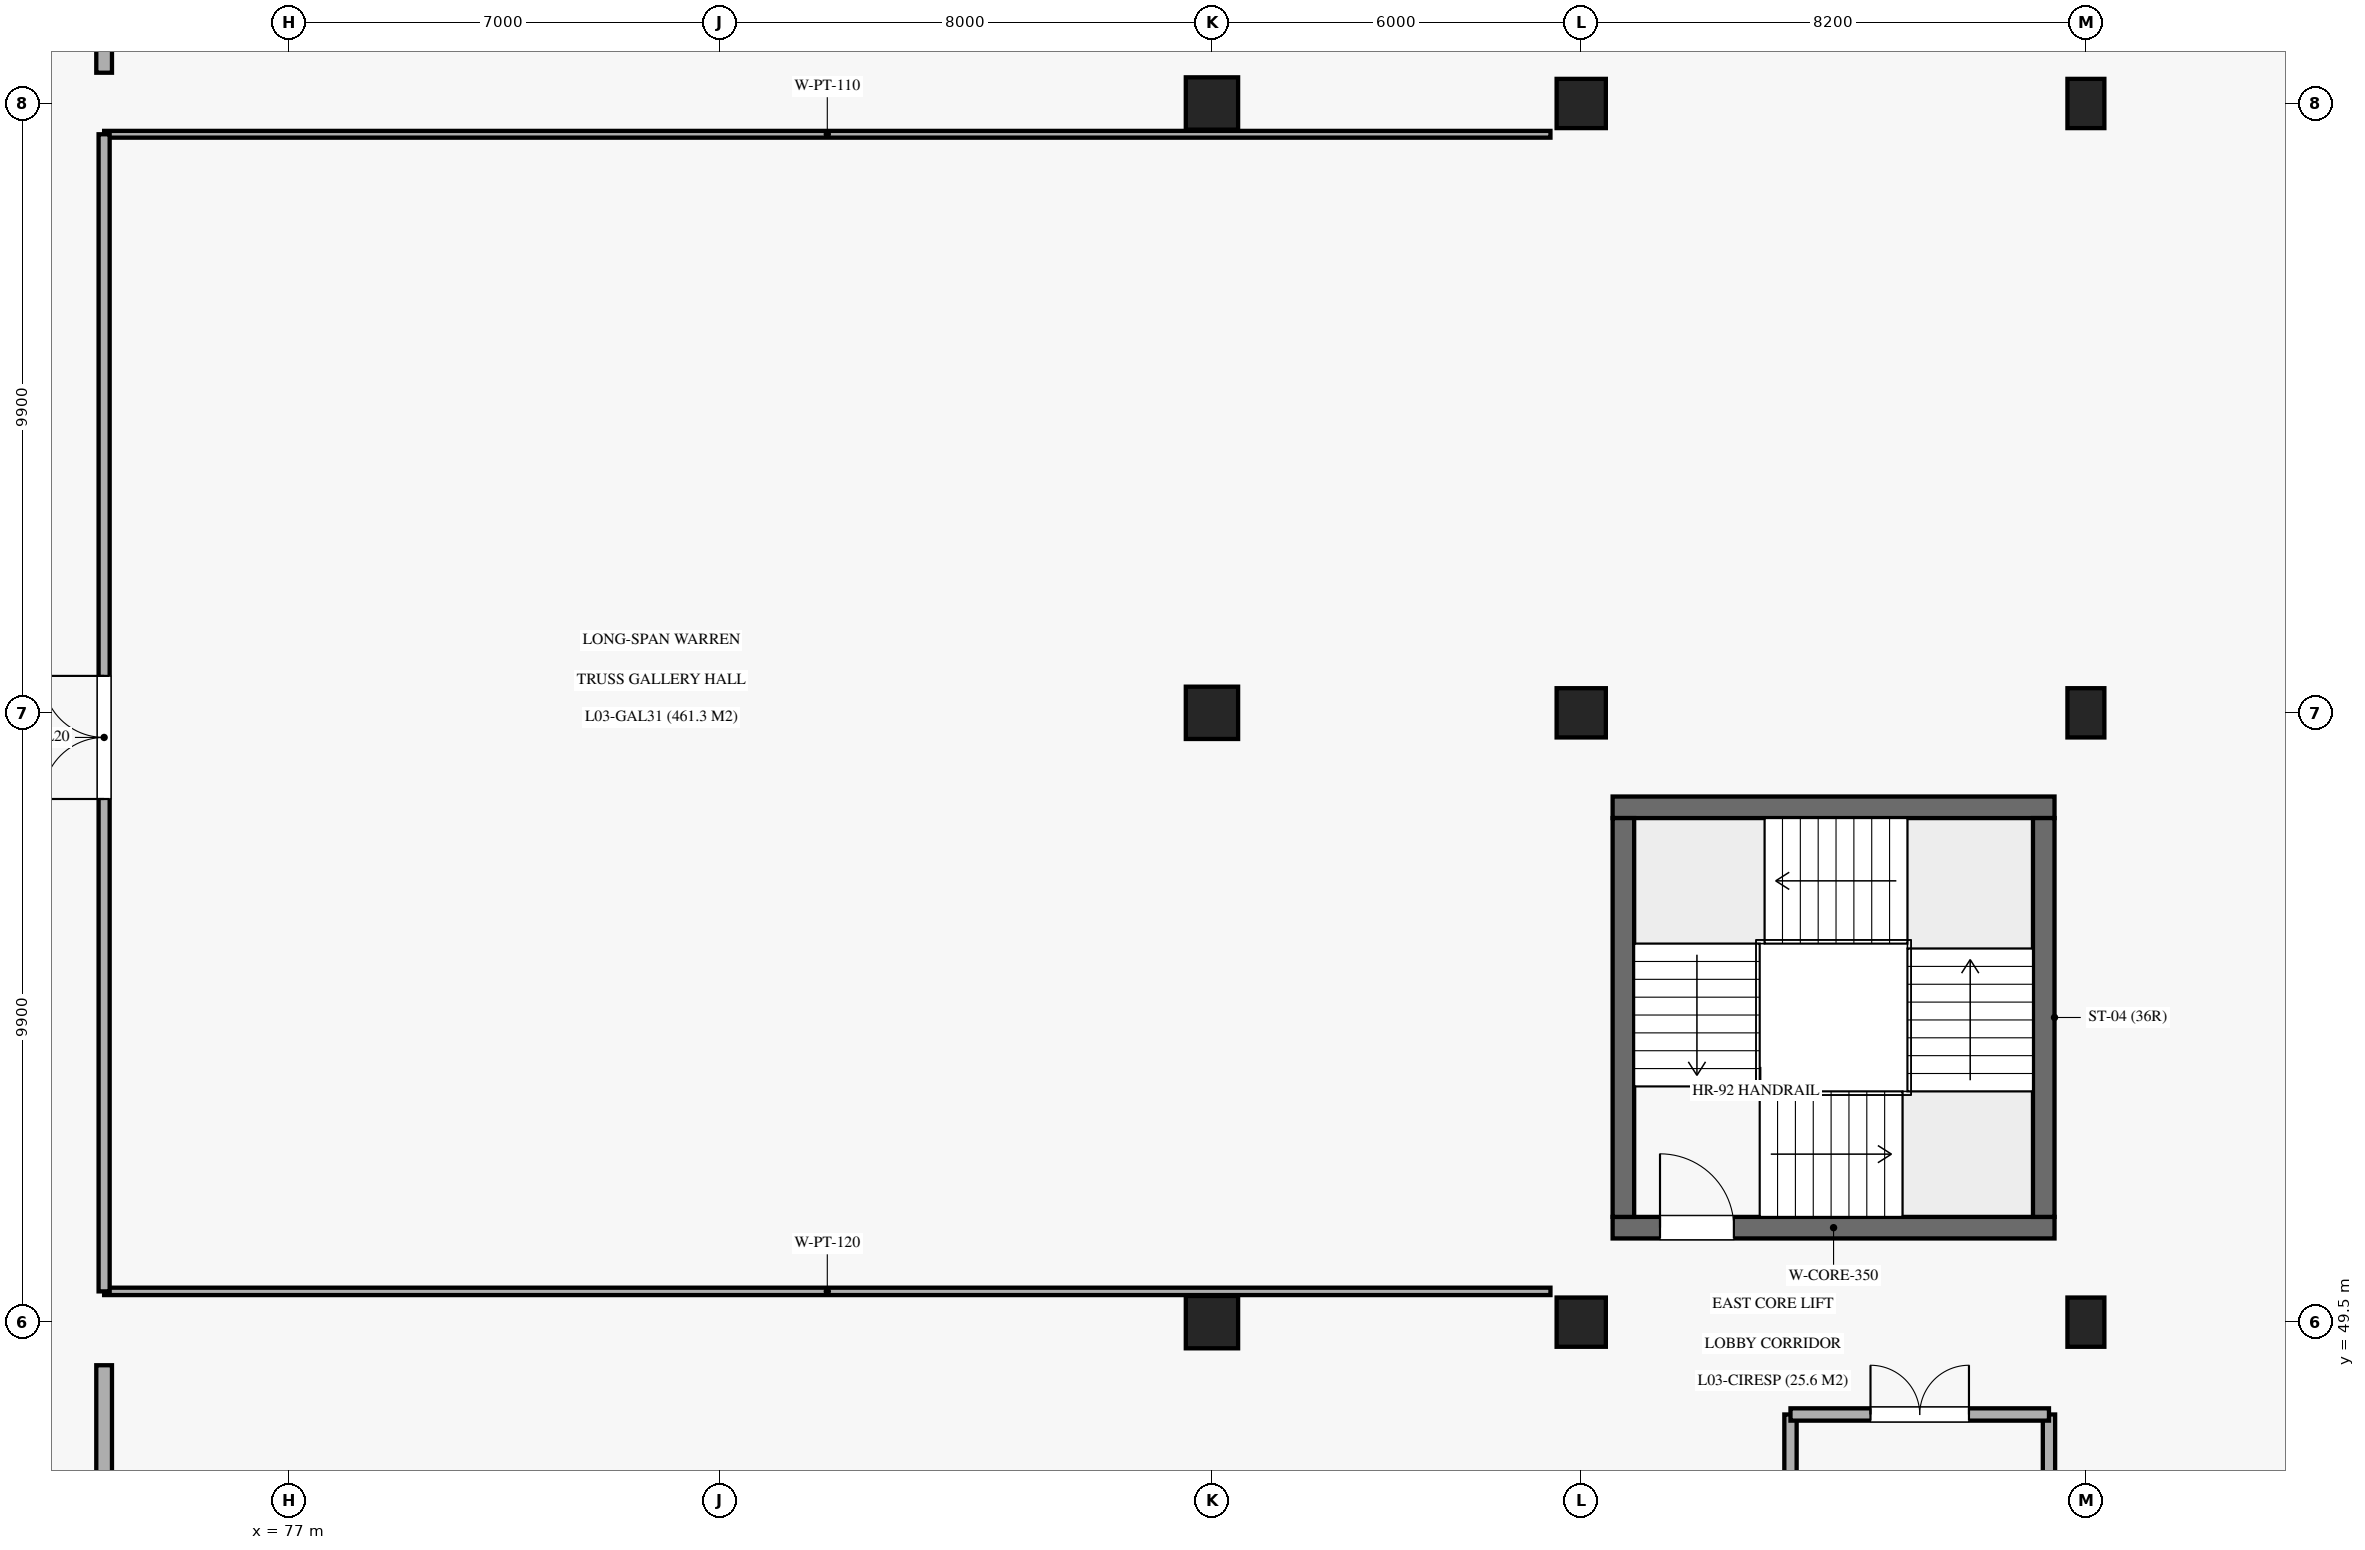
"""IFC4 building model, lengths in metres.
Left out: names, types, materials, properties, quantities, classifications, styles, units other than length and angle.
Written with IfcOpenShell. Run it as: python <this file> out.ifc"""

import sys

from ifc_helpers import new_model, si_unit, direction, frame, frame_2d, origin, origin_2d, place, context, subcontext, project, spatial, rectangle, extrude, element, fill, save


model = new_model("IFC4")
c1 = context("Model", 3, precision=1e-05, world=origin(), true_north=direction((0.0, 1.0)))
c2 = subcontext(c1, "Body", "Model", "MODEL_VIEW")
j1 = project(units=[si_unit("LENGTHUNIT", "METRE"), si_unit("PLANEANGLEUNIT", "RADIAN")], contexts=[c1])
p1 = place(None, origin())
s1 = spatial("IfcSite", under=j1, at=p1, CompositionType="ELEMENT")
p2 = place(p1, origin())
s2 = spatial("IfcBuilding", under=s1, at=p2, CompositionType="ELEMENT")
p3 = place(p2, frame((0.0, 0.0, 16.32)))
s3 = spatial("IfcBuildingStorey", under=s2, at=p3, CompositionType="ELEMENT", Elevation=16.32)
for number, where, z_axis, x_axis in (
    (1, (92.0, 49.5, 0.0), (0.0, 0.0, 1.0), (1.0, 0.0, 0.0)),
    (2, (92.0, 59.4, 0.0), (0.0, 0.0, 1.0), (1.0, 0.0, 0.0)),
    (3, (92.0, 69.3, 0.0), (0.0, 0.0, 1.0), (1.0, 0.0, 0.0)),
):
    element("IfcColumn", number, at=place(p3, frame(where, z_axis=z_axis, x_axis=x_axis)), inside=s3, PredefinedType="COLUMN", context=c2, shape_type="SweptSolid", body=[
        extrude(rectangle(XDim=0.85, YDim=0.85, at=origin_2d()), origin(), (0.0, 0.0, 1.0), 6.12),
    ])
for number, where, z_axis, x_axis in (
    (4, (98.0, 49.5, 0.0), (0.0, 0.0, 1.0), (1.0, 0.0, 0.0)),
    (5, (98.0, 59.4, 0.0), (0.0, 0.0, 1.0), (1.0, 0.0, 0.0)),
    (6, (98.0, 69.3, 0.0), (0.0, 0.0, 1.0), (1.0, 0.0, 0.0)),
):
    element("IfcColumn", number, at=place(p3, frame(where, z_axis=z_axis, x_axis=x_axis)), inside=s3, PredefinedType="COLUMN", context=c2, shape_type="SweptSolid", body=[
        extrude(rectangle(XDim=0.8, YDim=0.8, at=origin_2d()), origin(), (0.0, 0.0, 1.0), 6.12),
    ])
for number, where, z_axis, x_axis in (
    (7, (106.2, 49.5, 0.0), (0.0, 0.0, 1.0), (1.0, 0.0, 0.0)),
    (8, (106.2, 59.4, 0.0), (0.0, 0.0, 1.0), (1.0, 0.0, 0.0)),
    (9, (106.2, 69.3, 0.0), (0.0, 0.0, 1.0), (1.0, 0.0, 0.0)),
):
    element("IfcColumn", number, at=place(p3, frame(where, z_axis=z_axis, x_axis=x_axis)), inside=s3, PredefinedType="COLUMN", context=c2, shape_type="SweptSolid", body=[
        extrude(rectangle(XDim=0.6, YDim=0.8, at=origin_2d()), origin(), (0.0, 0.0, 1.0), 6.12),
    ])
p4 = place(p3, frame((98.51, 51.035, 0.0), z_axis=(0.0, 0.0, 1.0), x_axis=(1.0, 0.0, 0.0)))
e10 = element("IfcWall", 10, at=p4, inside=s3, PredefinedType="SHEAR", context=c2, shape_type="SweptSolid", body=[
    extrude(rectangle(XDim=7.18, YDim=0.35, at=frame_2d((3.59, 0.0))), origin(), (0.0, 0.0, 1.0), 5.86),
])
p5 = place(p4, frame((0.77, 0.0, 0.0)))
e11 = element("IfcOpeningElement", 11, at=p5, cuts=e10, PredefinedType="OPENING", context=c2, shape_type="SweptSolid", body=[
    extrude(rectangle(XDim=1.2, YDim=2.2, at=frame_2d((0.6, 1.1))), frame((0.0, 0.185, 0.0), z_axis=(0.0, -1.0, 0.0), x_axis=(1.0, 0.0, 0.0)), (0.0, 0.0, 1.0), 0.37),
])
p6 = place(p3, frame((98.51, 57.865, 0.0), z_axis=(0.0, 0.0, 1.0), x_axis=(1.0, 0.0, 0.0)))
e12 = element("IfcWall", 12, at=p6, inside=s3, PredefinedType="SHEAR", context=c2, shape_type="SweptSolid", body=[
    extrude(rectangle(XDim=7.18, YDim=0.35, at=frame_2d((3.59, 0.0))), origin(), (0.0, 0.0, 1.0), 5.86),
])
for number, where, z_axis, x_axis in (
    (13, (98.685, 51.21, 0.0), (0.0, 0.0, 1.0), (0.0, 1.0, 0.0)),
    (14, (105.515, 51.21, 0.0), (0.0, 0.0, 1.0), (0.0, 1.0, 0.0)),
):
    element("IfcWall", number, at=place(p3, frame(where, z_axis=z_axis, x_axis=x_axis)), inside=s3, PredefinedType="SHEAR", context=c2, shape_type="SweptSolid", body=[
        extrude(rectangle(XDim=6.48, YDim=0.35, at=frame_2d((3.24, 0.0))), origin(), (0.0, 0.0, 1.0), 5.86),
    ])
p7 = place(p3, frame((101.4, 45.6, 0.0), z_axis=(0.0, 0.0, 1.0), x_axis=(0.0, 1.0, 0.0)))
e15 = element("IfcWall", 15, at=p7, inside=s3, PredefinedType="SOLIDWALL", context=c2, shape_type="SweptSolid", body=[
    extrude(rectangle(XDim=2.4, YDim=0.2, at=frame_2d((1.2, 0.0))), origin(), (0.0, 0.0, 1.0), 4.98),
])
p8 = place(p3, frame((105.6, 40.3, 0.0), z_axis=(0.0, 0.0, 1.0), x_axis=(0.0, 1.0, 0.0)))
e16 = element("IfcWall", 16, at=p8, inside=s3, PredefinedType="SOLIDWALL", context=c2, shape_type="SweptSolid", body=[
    extrude(rectangle(XDim=7.7, YDim=0.2, at=frame_2d((3.85, 0.0))), origin(), (0.0, 0.0, 1.0), 4.98),
])
p9 = place(p3, frame((101.4, 48.0, 0.0), z_axis=(0.0, 0.0, 1.0), x_axis=(1.0, 0.0, 0.0)))
e17 = element("IfcWall", 17, at=p9, inside=s3, PredefinedType="SOLIDWALL", context=c2, shape_type="SweptSolid", body=[
    extrude(rectangle(XDim=4.2, YDim=0.2, at=frame_2d((2.1, 0.0))), origin(), (0.0, 0.0, 1.0), 4.98),
])
p10 = place(p9, frame((1.3, 0.0, 0.0)))
e18 = element("IfcOpeningElement", 18, at=p10, cuts=e17, PredefinedType="OPENING", context=c2, shape_type="SweptSolid", body=[
    extrude(rectangle(XDim=1.6, YDim=2.2, at=frame_2d((0.8, 1.1))), frame((0.0, 0.11, 0.0), z_axis=(0.0, -1.0, 0.0), x_axis=(1.0, 0.0, 0.0)), (0.0, 0.0, 1.0), 0.22),
])
p11 = place(p3, frame((74.0, 50.0, 0.0), z_axis=(0.0, 0.0, 1.0), x_axis=(1.0, 0.0, 0.0)))
e19 = element("IfcWall", 19, at=p11, inside=s3, PredefinedType="PARTITIONING", context=c2, shape_type="SweptSolid", body=[
    extrude(rectangle(XDim=23.5, YDim=0.12, at=frame_2d((11.75, 0.0))), origin(), (0.0, 0.0, 1.0), 4.98),
])
p12 = place(p3, frame((74.0, 68.8, 0.0), z_axis=(0.0, 0.0, 1.0), x_axis=(1.0, 0.0, 0.0)))
e20 = element("IfcWall", 20, at=p12, inside=s3, PredefinedType="PARTITIONING", context=c2, shape_type="SweptSolid", body=[
    extrude(rectangle(XDim=23.5, YDim=0.11, at=frame_2d((11.75, 0.0))), origin(), (0.0, 0.0, 1.0), 4.98),
])
p13 = place(p3, frame((74.0, 50.0, 0.0), z_axis=(0.0, 0.0, 1.0), x_axis=(0.0, 1.0, 0.0)))
e21 = element("IfcWall", 21, at=p13, inside=s3, PredefinedType="PARTITIONING", context=c2, shape_type="SweptSolid", body=[
    extrude(rectangle(XDim=18.8, YDim=0.18, at=frame_2d((9.4, 0.0))), origin(), (0.0, 0.0, 1.0), 4.98),
])
p14 = place(p13, frame((8.0, 0.0, 0.0)))
e22 = element("IfcOpeningElement", 22, at=p14, cuts=e21, PredefinedType="OPENING", context=c2, shape_type="SweptSolid", body=[
    extrude(rectangle(XDim=2.0, YDim=2.5, at=frame_2d((1.0, 1.25))), frame((0.0, 0.1, 0.0), z_axis=(0.0, -1.0, 0.0), x_axis=(1.0, 0.0, 0.0)), (0.0, 0.0, 1.0), 0.2),
])
p15 = place(p3, frame((74.0, 69.8, 0.0), z_axis=(0.0, 0.0, 1.0), x_axis=(0.0, 1.0, 0.0)))
e23 = element("IfcWall", 23, at=p15, inside=s3, PredefinedType="SOLIDWALL", context=c2, shape_type="SweptSolid", body=[
    extrude(rectangle(XDim=18.8, YDim=0.255, at=frame_2d((9.4, 0.0))), origin(), (0.0, 0.0, 1.0), 4.98),
])
p16 = place(p15, frame((8.0, 0.0, 0.0)))
e24 = element("IfcOpeningElement", 24, at=p16, cuts=e23, PredefinedType="OPENING", context=c2, shape_type="SweptSolid", body=[
    extrude(rectangle(XDim=2.0, YDim=2.4, at=frame_2d((1.0, 1.2))), frame((0.0, 0.137, 0.0), z_axis=(0.0, -1.0, 0.0), x_axis=(1.0, 0.0, 0.0)), (0.0, 0.0, 1.0), 0.275),
])
p17 = place(p3, frame((74.0, 30.2, 0.0), z_axis=(0.0, 0.0, 1.0), x_axis=(0.0, 1.0, 0.0)))
e25 = element("IfcWall", 25, at=p17, inside=s3, PredefinedType="SOLIDWALL", context=c2, shape_type="SweptSolid", body=[
    extrude(rectangle(XDim=18.6, YDim=0.255, at=frame_2d((9.3, 0.0))), origin(), (0.0, 0.0, 1.0), 4.98),
])
p18 = place(p17, frame((7.0, 0.0, 0.0)))
e26 = element("IfcOpeningElement", 26, at=p18, cuts=e25, PredefinedType="OPENING", context=c2, shape_type="SweptSolid", body=[
    extrude(rectangle(XDim=1.8, YDim=2.35, at=frame_2d((0.9, 1.175))), frame((0.0, 0.137, 0.0), z_axis=(0.0, -1.0, 0.0), x_axis=(1.0, 0.0, 0.0)), (0.0, 0.0, 1.0), 0.275),
])
p19 = place(p5, origin())
e27 = element("IfcDoor", 27, at=p19, inside=s3, OperationType="SINGLE_SWING_LEFT", PredefinedType="DOOR", context=c2, shape_type="SweptSolid", body=[
    extrude(rectangle(XDim=1.2, YDim=2.2, at=frame_2d((0.6, 1.1))), frame((0.0, 0.025, 0.0), z_axis=(0.0, -1.0, 0.0), x_axis=(1.0, 0.0, 0.0)), (0.0, 0.0, 1.0), 0.05),
])
fill(e11, e27)
p20 = place(p10, origin())
e28 = element("IfcDoor", 28, at=p20, inside=s3, OperationType="DOUBLE_DOOR_SINGLE_SWING", PredefinedType="DOOR", context=c2, shape_type="SweptSolid", body=[
    extrude(rectangle(XDim=1.6, YDim=2.2, at=frame_2d((0.8, 1.1))), frame((0.0, 0.025, 0.0), z_axis=(0.0, -1.0, 0.0), x_axis=(1.0, 0.0, 0.0)), (0.0, 0.0, 1.0), 0.05),
])
fill(e18, e28)
p21 = place(p14, origin())
e29 = element("IfcDoor", 29, at=p21, inside=s3, OperationType="DOUBLE_DOOR_SINGLE_SWING", PredefinedType="DOOR", context=c2, shape_type="SweptSolid", body=[
    extrude(rectangle(XDim=2.0, YDim=2.5, at=frame_2d((1.0, 1.25))), frame((0.0, 0.025, 0.0), z_axis=(0.0, -1.0, 0.0), x_axis=(1.0, 0.0, 0.0)), (0.0, 0.0, 1.0), 0.05),
])
fill(e22, e29)
save(model, sys.argv[1])
